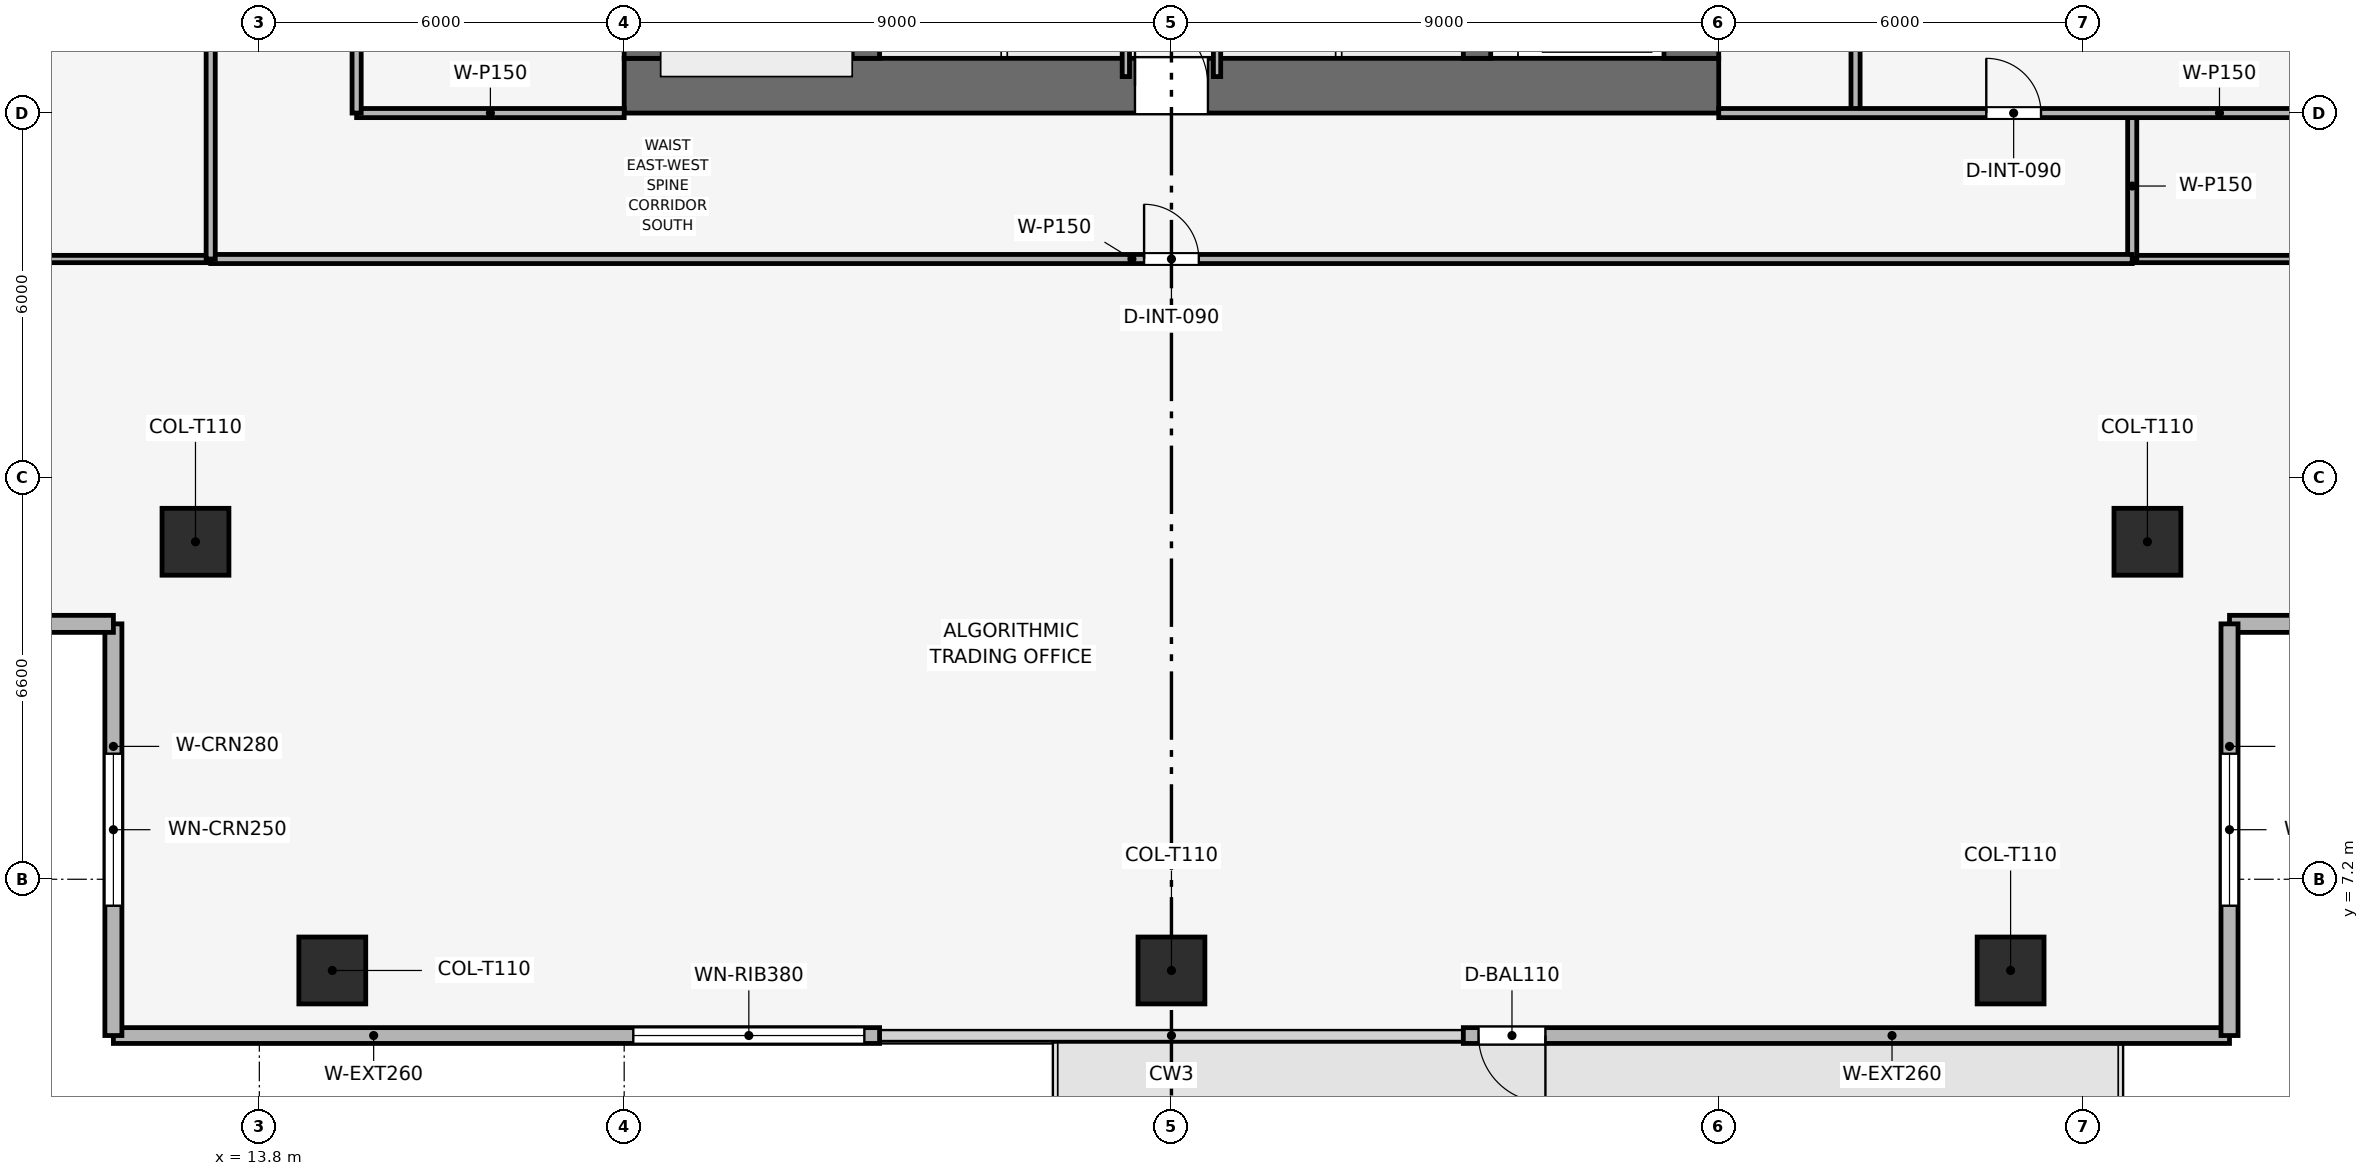
"""IFC4 building model, lengths in metres.
Left out: names, types, materials, properties, quantities, classifications, styles, units other than length and angle.
Written with IfcOpenShell. Run it as: python <this file> out.ifc"""

import sys

from ifc_helpers import new_model, si_unit, direction, frame, frame_2d, origin, origin_2d, place, context, subcontext, project, spatial, rectangle, extrude, element, fill, save


model = new_model("IFC4")
c1 = context("Model", 3, precision=1e-05, world=origin(), true_north=direction((0.0, 1.0)))
c2 = subcontext(c1, "Body", "Model", "MODEL_VIEW")
j1 = project(units=[si_unit("LENGTHUNIT", "METRE"), si_unit("PLANEANGLEUNIT", "RADIAN")], contexts=[c1])
p1 = place(None, origin())
s1 = spatial("IfcSite", under=j1, at=p1, CompositionType="ELEMENT")
p2 = place(p1, origin())
s2 = spatial("IfcBuilding", under=s1, at=p2, CompositionType="ELEMENT")
p3 = place(p2, frame((0.0, 0.0, 175.8)))
s3 = spatial("IfcBuildingStorey", under=s2, at=p3, CompositionType="ELEMENT", Elevation=175.8)
p4 = place(p3, frame((19.8, 20.25, 0.0), z_axis=(0.0, 0.0, 1.0), x_axis=(1.0, 0.0, 0.0)))
e1 = element("IfcWall", 1, at=p4, inside=s3, PredefinedType="SHEAR", context=c2, shape_type="SweptSolid", body=[
    extrude(rectangle(XDim=18.0, YDim=0.9, at=frame_2d((9.0, 0.0))), origin(), (0.0, 0.0, 1.0), 3.75),
])
p5 = place(p4, frame((8.4, 0.0, 0.0)))
e2 = element("IfcOpeningElement", 2, at=p5, cuts=e1, PredefinedType="OPENING", context=c2, shape_type="SweptSolid", body=[
    extrude(rectangle(XDim=1.2, YDim=2.2, at=frame_2d((0.6, 1.1))), frame((0.0, 0.46, 0.0), z_axis=(0.0, -1.0, 0.0), x_axis=(1.0, 0.0, 0.0)), (0.0, 0.0, 1.0), 0.92),
])
p6 = place(p3, frame((20.25, 20.7, 0.0), z_axis=(0.0, 0.0, 1.0), x_axis=(0.0, 1.0, 0.0)))
e3 = element("IfcWall", 3, at=p6, inside=s3, PredefinedType="SHEAR", context=c2, shape_type="SweptSolid", body=[
    extrude(rectangle(XDim=16.2, YDim=0.9, at=frame_2d((8.1, 0.0))), origin(), (0.0, 0.0, 1.0), 3.75),
])
p7 = place(p6, frame((10.1, 0.0, 0.0)))
e4 = element("IfcOpeningElement", 4, at=p7, cuts=e3, PredefinedType="OPENING", context=c2, shape_type="SweptSolid", body=[
    extrude(rectangle(XDim=1.1, YDim=2.15, at=frame_2d((0.55, 1.075))), frame((0.0, 0.46, 0.0), z_axis=(0.0, -1.0, 0.0), x_axis=(1.0, 0.0, 0.0)), (0.0, 0.0, 1.0), 0.92),
])
p8 = place(p3, frame((37.35, 20.7, 0.0), z_axis=(0.0, 0.0, 1.0), x_axis=(0.0, 1.0, 0.0)))
e5 = element("IfcWall", 5, at=p8, inside=s3, PredefinedType="SHEAR", context=c2, shape_type="SweptSolid", body=[
    extrude(rectangle(XDim=16.2, YDim=0.9, at=frame_2d((8.1, 0.0))), origin(), (0.0, 0.0, 1.0), 3.75),
])
p9 = place(p8, frame((4.6, 0.0, 0.0)))
e6 = element("IfcOpeningElement", 6, at=p9, cuts=e5, PredefinedType="OPENING", context=c2, shape_type="SweptSolid", body=[
    extrude(rectangle(XDim=1.1, YDim=2.15, at=frame_2d((0.55, 1.075))), frame((0.0, 0.46, 0.0), z_axis=(0.0, -1.0, 0.0), x_axis=(1.0, 0.0, 0.0)), (0.0, 0.0, 1.0), 0.92),
])
for number, where, z_axis, x_axis in (
    (7, (23.775, 20.7, 0.0), (0.0, 0.0, 1.0), (0.0, 1.0, 0.0)),
    (8, (33.825, 20.7, 0.0), (0.0, 0.0, 1.0), (0.0, 1.0, 0.0)),
):
    element("IfcWall", number, at=place(p3, frame(where, z_axis=z_axis, x_axis=x_axis)), inside=s3, PredefinedType="SHEAR", context=c2, shape_type="SweptSolid", body=[
        extrude(rectangle(XDim=16.2, YDim=0.45, at=frame_2d((8.1, 0.0))), origin(), (0.0, 0.0, 1.0), 3.75),
    ])
for number, where, z_axis, x_axis in (
    (9, (15.0, 5.7, 0.003), (0.0, 0.0, 1.0), (1.0, 0.0, 0.0)),
    (10, (28.8, 5.7, 0.003), (0.0, 0.0, 1.0), (1.0, 0.0, 0.0)),
    (11, (42.6, 5.7, 0.003), (0.0, 0.0, 1.0), (1.0, 0.0, 0.0)),
    (12, (12.75, 12.75, 0.003), (0.0, 0.0, 1.0), (1.0, 0.0, 0.0)),
    (13, (44.85, 12.75, 0.003), (0.0, 0.0, 1.0), (1.0, 0.0, 0.0)),
):
    element("IfcColumn", number, at=place(p3, frame(where, z_axis=z_axis, x_axis=x_axis)), inside=s3, PredefinedType="COLUMN", context=c2, shape_type="SweptSolid", body=[
        extrude(rectangle(XDim=1.1, YDim=1.1, at=origin_2d()), origin(), (0.0, 0.0, 1.0), 3.489),
    ])
p10 = place(p3, frame((46.2, 4.63, 0.0), z_axis=(0.0, 0.0, 1.0), x_axis=(-1.0, 0.0, 0.0)))
e14 = element("IfcWall", 14, at=p10, inside=s3, PredefinedType="SOLIDWALL", context=c2, shape_type="SweptSolid", body=[
    extrude(rectangle(XDim=12.6, YDim=0.26, at=frame_2d((6.3, 0.0))), origin(), (0.0, 0.0, 1.0), 3.495),
])
p11 = place(p10, frame((11.25, 0.0, 0.0)))
e15 = element("IfcOpeningElement", 15, at=p11, cuts=e14, PredefinedType="OPENING", context=c2, shape_type="SweptSolid", body=[
    extrude(rectangle(XDim=1.1, YDim=2.2, at=frame_2d((0.55, 1.1))), frame((0.0, 0.14, 0.0), z_axis=(0.0, -1.0, 0.0), x_axis=(1.0, 0.0, 0.0)), (0.0, 0.0, 1.0), 0.28),
])
p12 = place(p3, frame((24.0, 4.63, 0.0), z_axis=(0.0, 0.0, 1.0), x_axis=(-1.0, 0.0, 0.0)))
e16 = element("IfcWall", 16, at=p12, inside=s3, PredefinedType="SOLIDWALL", context=c2, shape_type="SweptSolid", body=[
    extrude(rectangle(XDim=12.6, YDim=0.26, at=frame_2d((6.3, 0.0))), origin(), (0.0, 0.0, 1.0), 3.495),
])
p13 = place(p12, frame((0.25, 0.0, 0.9)))
e17 = element("IfcOpeningElement", 17, at=p13, cuts=e16, PredefinedType="OPENING", context=c2, shape_type="SweptSolid", body=[
    extrude(rectangle(XDim=3.8, YDim=1.9, at=frame_2d((1.9, 0.95))), frame((0.0, 0.14, 0.0), z_axis=(0.0, -1.0, 0.0), x_axis=(1.0, 0.0, 0.0)), (0.0, 0.0, 1.0), 0.28),
])
p14 = place(p3, frame((11.4, 4.63, 0.0), z_axis=(0.0, 0.0, 1.0), x_axis=(0.0, 1.0, 0.0)))
e18 = element("IfcWall", 18, at=p14, inside=s3, PredefinedType="SOLIDWALL", context=c2, shape_type="SweptSolid", body=[
    extrude(rectangle(XDim=6.77, YDim=0.28, at=frame_2d((3.385, 0.0))), origin(), (0.0, 0.0, 1.0), 3.495),
])
p15 = place(p14, frame((2.135, 0.0, 0.9)))
e19 = element("IfcOpeningElement", 19, at=p15, cuts=e18, PredefinedType="OPENING", context=c2, shape_type="SweptSolid", body=[
    extrude(rectangle(XDim=2.5, YDim=1.9, at=frame_2d((1.25, 0.95))), frame((0.0, 0.15, 0.0), z_axis=(0.0, -1.0, 0.0), x_axis=(1.0, 0.0, 0.0)), (0.0, 0.0, 1.0), 0.3),
])
p16 = place(p3, frame((11.4, 11.4, 0.0), z_axis=(0.0, 0.0, 1.0), x_axis=(-1.0, 0.0, 0.0)))
e20 = element("IfcWall", 20, at=p16, inside=s3, PredefinedType="SOLIDWALL", context=c2, shape_type="SweptSolid", body=[
    extrude(rectangle(XDim=6.77, YDim=0.28, at=frame_2d((3.385, 0.0))), origin(), (0.0, 0.0, 1.0), 3.495),
])
p17 = place(p16, frame((2.135, 0.0, 0.9)))
e21 = element("IfcOpeningElement", 21, at=p17, cuts=e20, PredefinedType="OPENING", context=c2, shape_type="SweptSolid", body=[
    extrude(rectangle(XDim=2.5, YDim=1.9, at=frame_2d((1.25, 0.95))), frame((0.0, 0.15, 0.0), z_axis=(0.0, -1.0, 0.0), x_axis=(1.0, 0.0, 0.0)), (0.0, 0.0, 1.0), 0.3),
])
p18 = place(p3, frame((52.97, 11.4, 0.0), z_axis=(0.0, 0.0, 1.0), x_axis=(-1.0, 0.0, 0.0)))
e22 = element("IfcWall", 22, at=p18, inside=s3, PredefinedType="SOLIDWALL", context=c2, shape_type="SweptSolid", body=[
    extrude(rectangle(XDim=6.77, YDim=0.28, at=frame_2d((3.385, 0.0))), origin(), (0.0, 0.0, 1.0), 3.495),
])
p19 = place(p18, frame((2.135, 0.0, 0.9)))
e23 = element("IfcOpeningElement", 23, at=p19, cuts=e22, PredefinedType="OPENING", context=c2, shape_type="SweptSolid", body=[
    extrude(rectangle(XDim=2.5, YDim=1.9, at=frame_2d((1.25, 0.95))), frame((0.0, 0.15, 0.0), z_axis=(0.0, -1.0, 0.0), x_axis=(1.0, 0.0, 0.0)), (0.0, 0.0, 1.0), 0.3),
])
p20 = place(p3, frame((46.2, 11.4, 0.0), z_axis=(0.0, 0.0, 1.0), x_axis=(0.0, -1.0, 0.0)))
e24 = element("IfcWall", 24, at=p20, inside=s3, PredefinedType="SOLIDWALL", context=c2, shape_type="SweptSolid", body=[
    extrude(rectangle(XDim=6.77, YDim=0.28, at=frame_2d((3.385, 0.0))), origin(), (0.0, 0.0, 1.0), 3.495),
])
p21 = place(p20, frame((2.135, 0.0, 0.9)))
e25 = element("IfcOpeningElement", 25, at=p21, cuts=e24, PredefinedType="OPENING", context=c2, shape_type="SweptSolid", body=[
    extrude(rectangle(XDim=2.5, YDim=1.9, at=frame_2d((1.25, 0.95))), frame((0.0, 0.15, 0.0), z_axis=(0.0, -1.0, 0.0), x_axis=(1.0, 0.0, 0.0)), (0.0, 0.0, 1.0), 0.3),
])
for number, where, z_axis, x_axis in (
    (26, (28.05, 20.4, 0.0), (0.0, 0.0, 1.0), (0.0, 1.0, 0.0)),
    (27, (29.55, 20.4, 0.0), (0.0, 0.0, 1.0), (0.0, 1.0, 0.0)),
):
    element("IfcWall", number, at=place(p3, frame(where, z_axis=z_axis, x_axis=x_axis)), inside=s3, PredefinedType="PARTITIONING", context=c2, shape_type="SweptSolid", body=[
        extrude(rectangle(XDim=2.75, YDim=0.12, at=frame_2d((1.375, 0.0))), origin(), (0.0, 0.0, 1.0), 3.495),
    ])
p22 = place(p3, frame((15.4, 19.8, 0.0), z_axis=(0.0, 0.0, 1.0), x_axis=(1.0, 0.0, 0.0)))
e28 = element("IfcWall", 28, at=p22, inside=s3, PredefinedType="PARTITIONING", context=c2, shape_type="SweptSolid", body=[
    extrude(rectangle(XDim=4.4, YDim=0.15, at=frame_2d((2.2, 0.0))), origin(), (0.0, 0.0, 1.0), 3.03),
])
p23 = place(p3, frame((15.4, 19.8, 0.0), z_axis=(0.0, 0.0, 1.0), x_axis=(0.0, 1.0, 0.0)))
e29 = element("IfcWall", 29, at=p23, inside=s3, PredefinedType="PARTITIONING", context=c2, shape_type="SweptSolid", body=[
    extrude(rectangle(XDim=10.35, YDim=0.15, at=frame_2d((5.175, 0.0))), origin(), (0.0, 0.0, 1.0), 3.03),
])
p24 = place(p23, frame((1.2, 0.0, 0.0)))
e30 = element("IfcOpeningElement", 30, at=p24, cuts=e29, PredefinedType="OPENING", context=c2, shape_type="SweptSolid", body=[
    extrude(rectangle(XDim=0.9, YDim=2.1, at=frame_2d((0.45, 1.05))), frame((0.0, 0.085, 0.0), z_axis=(0.0, -1.0, 0.0), x_axis=(1.0, 0.0, 0.0)), (0.0, 0.0, 1.0), 0.17),
])
p25 = place(p23, frame((4.7, 0.0, 0.0)))
e31 = element("IfcOpeningElement", 31, at=p25, cuts=e29, PredefinedType="OPENING", context=c2, shape_type="SweptSolid", body=[
    extrude(rectangle(XDim=0.9, YDim=2.1, at=frame_2d((0.45, 1.05))), frame((0.0, 0.085, 0.0), z_axis=(0.0, -1.0, 0.0), x_axis=(1.0, 0.0, 0.0)), (0.0, 0.0, 1.0), 0.17),
])
p26 = place(p23, frame((8.1, 0.0, 0.0)))
e32 = element("IfcOpeningElement", 32, at=p26, cuts=e29, PredefinedType="OPENING", context=c2, shape_type="SweptSolid", body=[
    extrude(rectangle(XDim=0.95, YDim=2.1, at=frame_2d((0.475, 1.05))), frame((0.0, 0.085, 0.0), z_axis=(0.0, -1.0, 0.0), x_axis=(1.0, 0.0, 0.0)), (0.0, 0.0, 1.0), 0.17),
])
p27 = place(p3, frame((40.05, 19.8, 0.0), z_axis=(0.0, 0.0, 1.0), x_axis=(0.0, 1.0, 0.0)))
e33 = element("IfcWall", 33, at=p27, inside=s3, PredefinedType="PARTITIONING", context=c2, shape_type="SweptSolid", body=[
    extrude(rectangle(XDim=7.05, YDim=0.15, at=frame_2d((3.525, 0.0))), origin(), (0.0, 0.0, 1.0), 3.03),
])
p28 = place(p3, frame((4.63, 17.4, 0.0), z_axis=(0.0, 0.0, 1.0), x_axis=(1.0, 0.0, 0.0)))
e34 = element("IfcWall", 34, at=p28, inside=s3, PredefinedType="PARTITIONING", context=c2, shape_type="SweptSolid", body=[
    extrude(rectangle(XDim=8.37, YDim=0.12, at=frame_2d((4.185, 0.0))), origin(), (0.0, 0.0, 1.0), 2.98),
])
p29 = place(p3, frame((44.6, 17.4, 0.0), z_axis=(0.0, 0.0, 1.0), x_axis=(1.0, 0.0, 0.0)))
e35 = element("IfcWall", 35, at=p29, inside=s3, PredefinedType="PARTITIONING", context=c2, shape_type="SweptSolid", body=[
    extrude(rectangle(XDim=8.37, YDim=0.12, at=frame_2d((4.185, 0.0))), origin(), (0.0, 0.0, 1.0), 2.98),
])
p30 = place(p3, frame((44.6, 17.4, 0.0), z_axis=(0.0, 0.0, 1.0), x_axis=(0.0, 1.0, 0.0)))
e36 = element("IfcWall", 36, at=p30, inside=s3, PredefinedType="PARTITIONING", context=c2, shape_type="SweptSolid", body=[
    extrude(rectangle(XDim=2.4, YDim=0.15, at=frame_2d((1.2, 0.0))), origin(), (0.0, 0.0, 1.0), 3.495),
])
p31 = place(p3, frame((37.8, 19.8, 0.0), z_axis=(0.0, 0.0, 1.0), x_axis=(1.0, 0.0, 0.0)))
e37 = element("IfcWall", 37, at=p31, inside=s3, PredefinedType="PARTITIONING", context=c2, shape_type="SweptSolid", body=[
    extrude(rectangle(XDim=15.17, YDim=0.15, at=frame_2d((7.585, 0.0))), origin(), (0.0, 0.0, 1.0), 2.98),
])
p32 = place(p31, frame((4.4, 0.0, 0.0)))
e38 = element("IfcOpeningElement", 38, at=p32, cuts=e37, PredefinedType="OPENING", context=c2, shape_type="SweptSolid", body=[
    extrude(rectangle(XDim=0.9, YDim=2.1, at=frame_2d((0.45, 1.05))), frame((0.0, 0.085, 0.0), z_axis=(0.0, -1.0, 0.0), x_axis=(1.0, 0.0, 0.0)), (0.0, 0.0, 1.0), 0.17),
])
p33 = place(p3, frame((13.0, 17.4, 0.0), z_axis=(0.0, 0.0, 1.0), x_axis=(1.0, 0.0, 0.0)))
e39 = element("IfcWall", 39, at=p33, inside=s3, PredefinedType="PARTITIONING", context=c2, shape_type="SweptSolid", body=[
    extrude(rectangle(XDim=31.6, YDim=0.15, at=frame_2d((15.8, 0.0))), origin(), (0.0, 0.0, 1.0), 3.03),
])
p34 = place(p33, frame((15.35, 0.0, 0.0)))
e40 = element("IfcOpeningElement", 40, at=p34, cuts=e39, PredefinedType="OPENING", context=c2, shape_type="SweptSolid", body=[
    extrude(rectangle(XDim=0.9, YDim=2.1, at=frame_2d((0.45, 1.05))), frame((0.0, 0.085, 0.0), z_axis=(0.0, -1.0, 0.0), x_axis=(1.0, 0.0, 0.0)), (0.0, 0.0, 1.0), 0.17),
])
p35 = place(p3, frame((13.0, 17.4, 0.0), z_axis=(0.0, 0.0, 1.0), x_axis=(0.0, 1.0, 0.0)))
e41 = element("IfcWall", 41, at=p35, inside=s3, PredefinedType="PARTITIONING", context=c2, shape_type="SweptSolid", body=[
    extrude(rectangle(XDim=22.8, YDim=0.15, at=frame_2d((11.4, 0.0))), origin(), (0.0, 0.0, 1.0), 3.03),
])
p36 = place(p35, frame((10.95, 0.0, 0.0)))
e42 = element("IfcOpeningElement", 42, at=p36, cuts=e41, PredefinedType="OPENING", context=c2, shape_type="SweptSolid", body=[
    extrude(rectangle(XDim=0.9, YDim=2.1, at=frame_2d((0.45, 1.05))), frame((0.0, 0.085, 0.0), z_axis=(0.0, -1.0, 0.0), x_axis=(1.0, 0.0, 0.0)), (0.0, 0.0, 1.0), 0.17),
])
p37 = place(p11, origin())
e43 = element("IfcDoor", 43, at=p37, inside=s3, OperationType="SINGLE_SWING_LEFT", PredefinedType="DOOR", context=c2, shape_type="SweptSolid", body=[
    extrude(rectangle(XDim=1.1, YDim=2.2, at=frame_2d((0.55, 1.1))), frame((0.0, 0.025, 0.0), z_axis=(0.0, -1.0, 0.0), x_axis=(1.0, 0.0, 0.0)), (0.0, 0.0, 1.0), 0.05),
])
fill(e15, e43)
p38 = place(p13, origin())
e44 = element("IfcWindow", 44, at=p38, inside=s3, PartitioningType="SINGLE_PANEL", PredefinedType="WINDOW", context=c2, shape_type="SweptSolid", body=[
    extrude(rectangle(XDim=3.8, YDim=1.9, at=frame_2d((1.9, 0.95))), frame((0.0, 0.03, 0.0), z_axis=(0.0, -1.0, 0.0), x_axis=(1.0, 0.0, 0.0)), (0.0, 0.0, 1.0), 0.06),
])
fill(e17, e44)
p39 = place(p15, origin())
e45 = element("IfcWindow", 45, at=p39, inside=s3, PartitioningType="SINGLE_PANEL", PredefinedType="WINDOW", context=c2, shape_type="SweptSolid", body=[
    extrude(rectangle(XDim=2.5, YDim=1.9, at=frame_2d((1.25, 0.95))), frame((0.0, 0.03, 0.0), z_axis=(0.0, -1.0, 0.0), x_axis=(1.0, 0.0, 0.0)), (0.0, 0.0, 1.0), 0.06),
])
fill(e19, e45)
p40 = place(p21, origin())
e46 = element("IfcWindow", 46, at=p40, inside=s3, PartitioningType="SINGLE_PANEL", PredefinedType="WINDOW", context=c2, shape_type="SweptSolid", body=[
    extrude(rectangle(XDim=2.5, YDim=1.9, at=frame_2d((1.25, 0.95))), frame((0.0, 0.03, 0.0), z_axis=(0.0, -1.0, 0.0), x_axis=(1.0, 0.0, 0.0)), (0.0, 0.0, 1.0), 0.06),
])
fill(e25, e46)
p41 = place(p32, origin())
e47 = element("IfcDoor", 47, at=p41, inside=s3, OperationType="SINGLE_SWING_LEFT", PredefinedType="DOOR", context=c2, shape_type="SweptSolid", body=[
    extrude(rectangle(XDim=0.9, YDim=2.1, at=frame_2d((0.45, 1.05))), frame((0.0, 0.025, 0.0), z_axis=(0.0, -1.0, 0.0), x_axis=(1.0, 0.0, 0.0)), (0.0, 0.0, 1.0), 0.05),
])
fill(e38, e47)
p42 = place(p34, origin())
e48 = element("IfcDoor", 48, at=p42, inside=s3, OperationType="SINGLE_SWING_LEFT", PredefinedType="DOOR", context=c2, shape_type="SweptSolid", body=[
    extrude(rectangle(XDim=0.9, YDim=2.1, at=frame_2d((0.45, 1.05))), frame((0.0, 0.025, 0.0), z_axis=(0.0, -1.0, 0.0), x_axis=(1.0, 0.0, 0.0)), (0.0, 0.0, 1.0), 0.05),
])
fill(e40, e48)
p43 = place(p5, origin())
e49 = element("IfcDoor", 49, at=p43, inside=s3, OperationType="SINGLE_SWING_LEFT", PredefinedType="DOOR", context=c2, shape_type="SweptSolid", body=[
    extrude(rectangle(XDim=1.2, YDim=2.2, at=frame_2d((0.6, 1.1))), frame((0.0, 0.025, 0.0), z_axis=(0.0, -1.0, 0.0), x_axis=(1.0, 0.0, 0.0)), (0.0, 0.0, 1.0), 0.05),
])
fill(e2, e49)
save(model, sys.argv[1])
